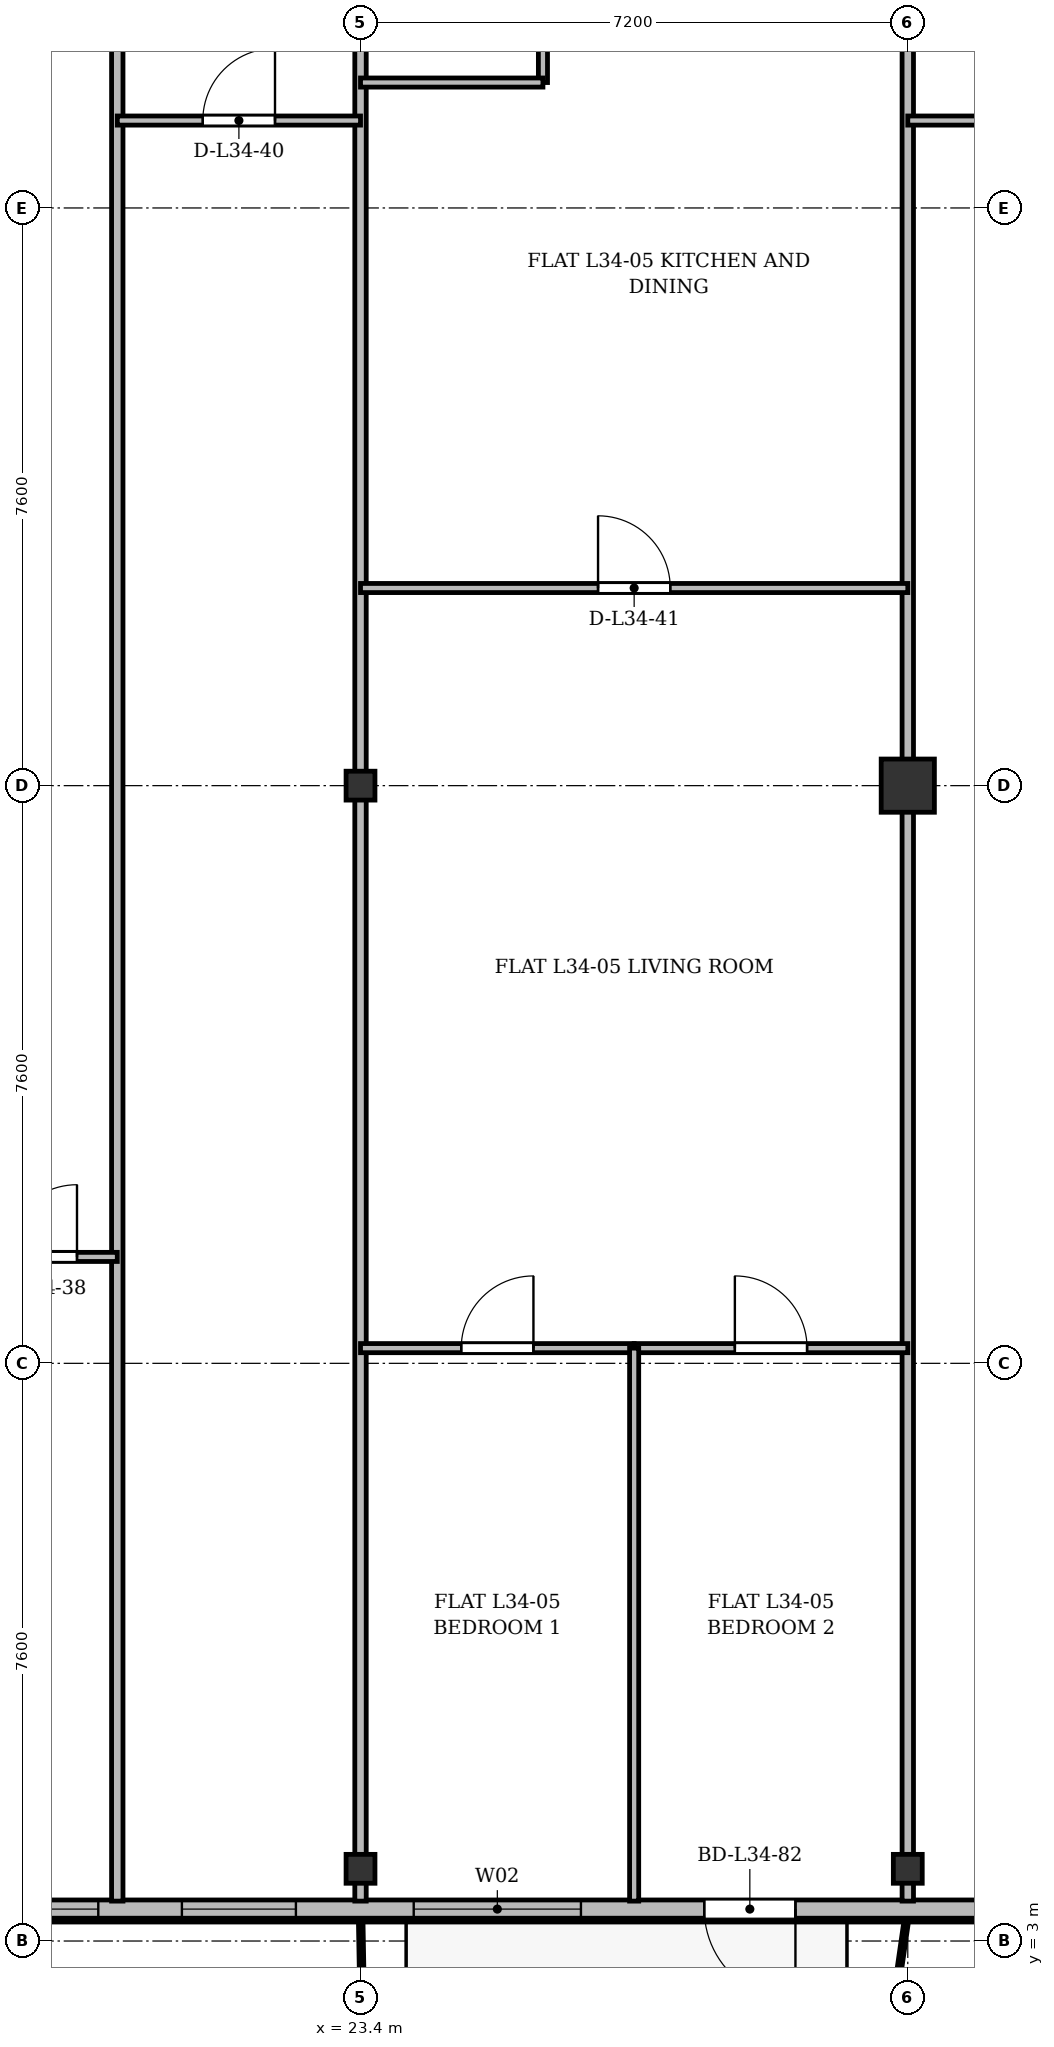
"""IFC4 building model, lengths in metres.
Left out: names, types, materials, properties, quantities, classifications, styles, units other than length and angle.
Written with IfcOpenShell. Run it as: python <this file> out.ifc"""

import sys

from ifc_helpers import new_model, si_unit, direction, frame, frame_2d, origin, origin_2d, place, context, subcontext, project, spatial, rectangle, i_section, extrude, source, transform, mapped, element, fill, save


model = new_model("IFC4")
c1 = context("Model", 3, precision=1e-05, world=origin(), true_north=direction((0.0, 1.0)))
c2 = subcontext(c1, "Body", "Model", "MODEL_VIEW")
j1 = project(units=[si_unit("LENGTHUNIT", "METRE"), si_unit("PLANEANGLEUNIT", "RADIAN")], contexts=[c1])
p1 = place(None, origin())
s1 = spatial("IfcSite", under=j1, at=p1, CompositionType="ELEMENT")
p2 = place(p1, origin())
s2 = spatial("IfcBuilding", under=s1, at=p2, CompositionType="ELEMENT")
p3 = place(p2, frame((0.0, 0.0, 132.1)))
s3 = spatial("IfcBuildingStorey", under=s2, at=p3, CompositionType="ELEMENT", Elevation=132.1)
m1 = source(origin(), c2, "Body", "SweptSolid", [
    extrude(i_section(OverallWidth=0.38, OverallDepth=0.38, WebThickness=0.02, FlangeThickness=0.03, at=origin_2d()), origin(), (0.0, 0.0, 1.0), 3.6),
])
for number, where, z_axis, x_axis in (
    (1, (23.4, 3.95, 0.0), (0.0, 0.0, 1.0), (1.0, 0.0, 0.0)),
    (2, (23.4, 18.2, 0.0), (0.0, 0.0, 1.0), (1.0, 0.0, 0.0)),
    (3, (30.6, 3.95, 0.0), (0.0, 0.0, 1.0), (1.0, 0.0, 0.0)),
):
    element("IfcColumn", number, at=place(p3, frame(where, z_axis=z_axis, x_axis=x_axis)), inside=s3, PredefinedType="COLUMN", context=c2, shape_type="MappedRepresentation", body=[
        mapped(m1, transform((0.0, 0.0, 0.0), x_axis=(1.0, 0.0, 0.0), y_axis=(0.0, 1.0, 0.0), z_axis=(0.0, 0.0, 1.0), scale=1.0)),
    ])
m2 = source(origin(), c2, "Body", "SweptSolid", [
    extrude(rectangle(XDim=0.7, YDim=0.7, at=origin_2d()), origin(), (0.0, 0.0, 1.0), 3.6),
])
p4 = place(p3, frame((30.6, 18.2, 0.0), z_axis=(0.0, 0.0, 1.0), x_axis=(1.0, 0.0, 0.0)))
e4 = element("IfcColumn", 4, at=p4, inside=s3, PredefinedType="COLUMN", context=c2, shape_type="MappedRepresentation", body=[
    mapped(m2, transform((0.0, 0.0, 0.0), x_axis=(1.0, 0.0, 0.0), y_axis=(0.0, 1.0, 0.0), z_axis=(0.0, 0.0, 1.0), scale=1.0)),
])
p5 = place(p3, frame((63.6, 3.42, 0.0), z_axis=(0.0, 0.0, 1.0), x_axis=(-1.0, 0.0, 0.0)))
e5 = element("IfcWall", 5, at=p5, inside=s3, PredefinedType="SOLIDWALL", context=c2, shape_type="SweptSolid", body=[
    extrude(rectangle(XDim=52.8, YDim=0.24, at=frame_2d((26.4, 0.0))), origin(), (0.0, 0.0, 1.0), 3.35),
])
p6 = place(p5, frame((0.42, 0.0, 0.9)))
e6 = element("IfcOpeningElement", 6, at=p6, cuts=e5, PredefinedType="OPENING", context=c2, shape_type="SweptSolid", body=[
    extrude(rectangle(XDim=1.65, YDim=1.85, at=frame_2d((0.825, 0.925))), frame((0.0, 0.13, 0.0), z_axis=(0.0, -1.0, 0.0), x_axis=(1.0, 0.0, 0.0)), (0.0, 0.0, 1.0), 0.26),
])
p7 = place(p5, frame((2.75, 0.0, 0.9)))
e7 = element("IfcOpeningElement", 7, at=p7, cuts=e5, PredefinedType="OPENING", context=c2, shape_type="SweptSolid", body=[
    extrude(rectangle(XDim=1.8, YDim=1.8, at=frame_2d((0.9, 0.9))), frame((0.0, 0.13, 0.0), z_axis=(0.0, -1.0, 0.0), x_axis=(1.0, 0.0, 0.0)), (0.0, 0.0, 1.0), 0.26),
])
p8 = place(p5, frame((5.902, 0.0, 0.0)))
e8 = element("IfcOpeningElement", 8, at=p8, cuts=e5, PredefinedType="OPENING", context=c2, shape_type="SweptSolid", body=[
    extrude(rectangle(XDim=1.2, YDim=2.2, at=frame_2d((0.6, 1.1))), frame((0.0, 0.13, 0.0), z_axis=(0.0, -1.0, 0.0), x_axis=(1.0, 0.0, 0.0)), (0.0, 0.0, 1.0), 0.26),
])
p9 = place(p5, frame((7.65, 0.0, 0.9)))
e9 = element("IfcOpeningElement", 9, at=p9, cuts=e5, PredefinedType="OPENING", context=c2, shape_type="SweptSolid", body=[
    extrude(rectangle(XDim=1.5, YDim=1.75, at=frame_2d((0.75, 0.875))), frame((0.0, 0.13, 0.0), z_axis=(0.0, -1.0, 0.0), x_axis=(1.0, 0.0, 0.0)), (0.0, 0.0, 1.0), 0.26),
])
p10 = place(p5, frame((10.0, 0.0, 0.9)))
e10 = element("IfcOpeningElement", 10, at=p10, cuts=e5, PredefinedType="OPENING", context=c2, shape_type="SweptSolid", body=[
    extrude(rectangle(XDim=2.0, YDim=1.95, at=frame_2d((1.0, 0.975))), frame((0.0, 0.13, 0.0), z_axis=(0.0, -1.0, 0.0), x_axis=(1.0, 0.0, 0.0)), (0.0, 0.0, 1.0), 0.26),
])
p11 = place(p5, frame((12.975, 0.0, 0.9)))
e11 = element("IfcOpeningElement", 11, at=p11, cuts=e5, PredefinedType="OPENING", context=c2, shape_type="SweptSolid", body=[
    extrude(rectangle(XDim=1.65, YDim=1.85, at=frame_2d((0.825, 0.925))), frame((0.0, 0.13, 0.0), z_axis=(0.0, -1.0, 0.0), x_axis=(1.0, 0.0, 0.0)), (0.0, 0.0, 1.0), 0.26),
])
p12 = place(p5, frame((15.3, 0.0, 0.9)))
e12 = element("IfcOpeningElement", 12, at=p12, cuts=e5, PredefinedType="OPENING", context=c2, shape_type="SweptSolid", body=[
    extrude(rectangle(XDim=1.8, YDim=1.8, at=frame_2d((0.9, 0.9))), frame((0.0, 0.13, 0.0), z_axis=(0.0, -1.0, 0.0), x_axis=(1.0, 0.0, 0.0)), (0.0, 0.0, 1.0), 0.26),
])
p13 = place(p5, frame((17.85, 0.0, 0.9)))
e13 = element("IfcOpeningElement", 13, at=p13, cuts=e5, PredefinedType="OPENING", context=c2, shape_type="SweptSolid", body=[
    extrude(rectangle(XDim=1.5, YDim=1.75, at=frame_2d((0.75, 0.875))), frame((0.0, 0.13, 0.0), z_axis=(0.0, -1.0, 0.0), x_axis=(1.0, 0.0, 0.0)), (0.0, 0.0, 1.0), 0.26),
])
p14 = place(p5, frame((20.7, 0.0, 0.9)))
e14 = element("IfcOpeningElement", 14, at=p14, cuts=e5, PredefinedType="OPENING", context=c2, shape_type="SweptSolid", body=[
    extrude(rectangle(XDim=1.5, YDim=1.75, at=frame_2d((0.75, 0.875))), frame((0.0, 0.13, 0.0), z_axis=(0.0, -1.0, 0.0), x_axis=(1.0, 0.0, 0.0)), (0.0, 0.0, 1.0), 0.26),
])
p15 = place(p5, frame((23.75, 0.0, 0.9)))
e15 = element("IfcOpeningElement", 15, at=p15, cuts=e5, PredefinedType="OPENING", context=c2, shape_type="SweptSolid", body=[
    extrude(rectangle(XDim=2.0, YDim=1.95, at=frame_2d((1.0, 0.975))), frame((0.0, 0.13, 0.0), z_axis=(0.0, -1.0, 0.0), x_axis=(1.0, 0.0, 0.0)), (0.0, 0.0, 1.0), 0.26),
])
p16 = place(p5, frame((28.875, 0.0, 0.9)))
e16 = element("IfcOpeningElement", 16, at=p16, cuts=e5, PredefinedType="OPENING", context=c2, shape_type="SweptSolid", body=[
    extrude(rectangle(XDim=1.65, YDim=1.85, at=frame_2d((0.825, 0.925))), frame((0.0, 0.13, 0.0), z_axis=(0.0, -1.0, 0.0), x_axis=(1.0, 0.0, 0.0)), (0.0, 0.0, 1.0), 0.26),
])
p17 = place(p5, frame((34.478, 0.0, 0.0)))
e17 = element("IfcOpeningElement", 17, at=p17, cuts=e5, PredefinedType="OPENING", context=c2, shape_type="SweptSolid", body=[
    extrude(rectangle(XDim=1.2, YDim=2.2, at=frame_2d((0.6, 1.1))), frame((0.0, 0.13, 0.0), z_axis=(0.0, -1.0, 0.0), x_axis=(1.0, 0.0, 0.0)), (0.0, 0.0, 1.0), 0.26),
])
p18 = place(p5, frame((37.3, 0.0, 0.9)))
e18 = element("IfcOpeningElement", 18, at=p18, cuts=e5, PredefinedType="OPENING", context=c2, shape_type="SweptSolid", body=[
    extrude(rectangle(XDim=2.2, YDim=1.8, at=frame_2d((1.1, 0.9))), frame((0.0, 0.13, 0.0), z_axis=(0.0, -1.0, 0.0), x_axis=(1.0, 0.0, 0.0)), (0.0, 0.0, 1.0), 0.26),
])
p19 = place(p5, frame((41.05, 0.0, 0.9)))
e19 = element("IfcOpeningElement", 19, at=p19, cuts=e5, PredefinedType="OPENING", context=c2, shape_type="SweptSolid", body=[
    extrude(rectangle(XDim=1.5, YDim=1.75, at=frame_2d((0.75, 0.875))), frame((0.0, 0.13, 0.0), z_axis=(0.0, -1.0, 0.0), x_axis=(1.0, 0.0, 0.0)), (0.0, 0.0, 1.0), 0.26),
])
p20 = place(p5, frame((43.65, 0.0, 0.9)))
e20 = element("IfcOpeningElement", 20, at=p20, cuts=e5, PredefinedType="OPENING", context=c2, shape_type="SweptSolid", body=[
    extrude(rectangle(XDim=1.5, YDim=1.75, at=frame_2d((0.75, 0.875))), frame((0.0, 0.13, 0.0), z_axis=(0.0, -1.0, 0.0), x_axis=(1.0, 0.0, 0.0)), (0.0, 0.0, 1.0), 0.26),
])
p21 = place(p5, frame((45.775, 0.0, 0.9)))
e21 = element("IfcOpeningElement", 21, at=p21, cuts=e5, PredefinedType="OPENING", context=c2, shape_type="SweptSolid", body=[
    extrude(rectangle(XDim=1.65, YDim=1.85, at=frame_2d((0.825, 0.925))), frame((0.0, 0.13, 0.0), z_axis=(0.0, -1.0, 0.0), x_axis=(1.0, 0.0, 0.0)), (0.0, 0.0, 1.0), 0.26),
])
p22 = place(p5, frame((48.1, 0.0, 0.9)))
e22 = element("IfcOpeningElement", 22, at=p22, cuts=e5, PredefinedType="OPENING", context=c2, shape_type="SweptSolid", body=[
    extrude(rectangle(XDim=1.8, YDim=1.8, at=frame_2d((0.9, 0.9))), frame((0.0, 0.13, 0.0), z_axis=(0.0, -1.0, 0.0), x_axis=(1.0, 0.0, 0.0)), (0.0, 0.0, 1.0), 0.26),
])
p23 = place(p5, frame((50.705, 0.0, 0.9)))
e23 = element("IfcOpeningElement", 23, at=p23, cuts=e5, PredefinedType="OPENING", context=c2, shape_type="SweptSolid", body=[
    extrude(rectangle(XDim=1.5, YDim=1.75, at=frame_2d((0.75, 0.875))), frame((0.0, 0.13, 0.0), z_axis=(0.0, -1.0, 0.0), x_axis=(1.0, 0.0, 0.0)), (0.0, 0.0, 1.0), 0.26),
])
for number, where, z_axis, x_axis in (
    (24, (23.4, 3.525, 0.0), (0.0, 0.0, 1.0), (0.0, 1.0, 0.0)),
    (25, (30.6, 3.525, 0.0), (0.0, 0.0, 1.0), (0.0, 1.0, 0.0)),
):
    element("IfcWall", number, at=place(p3, frame(where, z_axis=z_axis, x_axis=x_axis)), inside=s3, PredefinedType="PARTITIONING", context=c2, shape_type="SweptSolid", body=[
        extrude(rectangle(XDim=27.275, YDim=0.15, at=frame_2d((13.638, 0.0))), origin(), (0.0, 0.0, 1.0), 2.85),
    ])
p24 = place(p3, frame((20.2, 3.525, 0.0), z_axis=(0.0, 0.0, 1.0), x_axis=(0.0, 1.0, 0.0)))
e26 = element("IfcWall", 26, at=p24, inside=s3, PredefinedType="PARTITIONING", context=c2, shape_type="SweptSolid", body=[
    extrude(rectangle(XDim=27.275, YDim=0.15, at=frame_2d((13.638, 0.0))), origin(), (0.0, 0.0, 1.0), 2.75),
])
p25 = place(p3, frame((18.2, 12.0, 0.0), z_axis=(0.0, 0.0, 1.0), x_axis=(1.0, 0.0, 0.0)))
e27 = element("IfcWall", 27, at=p25, inside=s3, PredefinedType="PARTITIONING", context=c2, shape_type="SweptSolid", body=[
    extrude(rectangle(XDim=2.0, YDim=0.12, at=frame_2d((1.0, 0.0))), origin(), (0.0, 0.0, 1.0), 3.35),
])
p26 = place(p25, frame((0.52, 0.0, 0.0)))
e28 = element("IfcOpeningElement", 28, at=p26, cuts=e27, PredefinedType="OPENING", context=c2, shape_type="SweptSolid", body=[
    extrude(rectangle(XDim=0.95, YDim=2.15, at=frame_2d((0.475, 1.075))), frame((0.0, 0.07, 0.0), z_axis=(0.0, -1.0, 0.0), x_axis=(1.0, 0.0, 0.0)), (0.0, 0.0, 1.0), 0.14),
])
p27 = place(p3, frame((20.2, 26.95, 0.0), z_axis=(0.0, 0.0, 1.0), x_axis=(1.0, 0.0, 0.0)))
e29 = element("IfcWall", 29, at=p27, inside=s3, PredefinedType="PARTITIONING", context=c2, shape_type="SweptSolid", body=[
    extrude(rectangle(XDim=3.2, YDim=0.12, at=frame_2d((1.6, 0.0))), origin(), (0.0, 0.0, 1.0), 2.85),
])
p28 = place(p27, frame((1.125, 0.0, 0.0)))
e30 = element("IfcOpeningElement", 30, at=p28, cuts=e29, PredefinedType="OPENING", context=c2, shape_type="SweptSolid", body=[
    extrude(rectangle(XDim=0.95, YDim=2.15, at=frame_2d((0.475, 1.075))), frame((0.0, 0.07, 0.0), z_axis=(0.0, -1.0, 0.0), x_axis=(1.0, 0.0, 0.0)), (0.0, 0.0, 1.0), 0.14),
])
p29 = place(p3, frame((23.4, 20.8, 0.0), z_axis=(0.0, 0.0, 1.0), x_axis=(1.0, 0.0, 0.0)))
e31 = element("IfcWall", 31, at=p29, inside=s3, PredefinedType="PARTITIONING", context=c2, shape_type="SweptSolid", body=[
    extrude(rectangle(XDim=7.2, YDim=0.12, at=frame_2d((3.6, 0.0))), origin(), (0.0, 0.0, 1.0), 2.85),
])
p30 = place(p29, frame((3.125, 0.0, 0.0)))
e32 = element("IfcOpeningElement", 32, at=p30, cuts=e31, PredefinedType="OPENING", context=c2, shape_type="SweptSolid", body=[
    extrude(rectangle(XDim=0.95, YDim=2.15, at=frame_2d((0.475, 1.075))), frame((0.0, 0.07, 0.0), z_axis=(0.0, -1.0, 0.0), x_axis=(1.0, 0.0, 0.0)), (0.0, 0.0, 1.0), 0.14),
])
p31 = place(p3, frame((25.8, 27.45, 0.0), z_axis=(0.0, 0.0, 1.0), x_axis=(0.0, 1.0, 0.0)))
e33 = element("IfcWall", 33, at=p31, inside=s3, PredefinedType="PARTITIONING", context=c2, shape_type="SweptSolid", body=[
    extrude(rectangle(XDim=3.35, YDim=0.12, at=frame_2d((1.675, 0.0))), origin(), (0.0, 0.0, 1.0), 3.35),
])
p32 = place(p31, frame((0.8, 0.0, 0.0)))
e34 = element("IfcOpeningElement", 34, at=p32, cuts=e33, PredefinedType="OPENING", context=c2, shape_type="SweptSolid", body=[
    extrude(rectangle(XDim=0.85, YDim=2.1, at=frame_2d((0.425, 1.05))), frame((0.0, 0.07, 0.0), z_axis=(0.0, -1.0, 0.0), x_axis=(1.0, 0.0, 0.0)), (0.0, 0.0, 1.0), 0.14),
])
p33 = place(p3, frame((23.4, 27.45, 0.0), z_axis=(0.0, 0.0, 1.0), x_axis=(1.0, 0.0, 0.0)))
e35 = element("IfcWall", 35, at=p33, inside=s3, PredefinedType="PARTITIONING", context=c2, shape_type="SweptSolid", body=[
    extrude(rectangle(XDim=2.4, YDim=0.12, at=frame_2d((1.2, 0.0))), origin(), (0.0, 0.0, 1.0), 2.85),
])
p34 = place(p3, frame((23.4, 10.8, 0.0), z_axis=(0.0, 0.0, 1.0), x_axis=(1.0, 0.0, 0.0)))
e36 = element("IfcWall", 36, at=p34, inside=s3, PredefinedType="PARTITIONING", context=c2, shape_type="SweptSolid", body=[
    extrude(rectangle(XDim=3.6, YDim=0.12, at=frame_2d((1.8, 0.0))), origin(), (0.0, 0.0, 1.0), 2.85),
])
p35 = place(p34, frame((1.325, 0.0, 0.0)))
e37 = element("IfcOpeningElement", 37, at=p35, cuts=e36, PredefinedType="OPENING", context=c2, shape_type="SweptSolid", body=[
    extrude(rectangle(XDim=0.95, YDim=2.15, at=frame_2d((0.475, 1.075))), frame((0.0, 0.07, 0.0), z_axis=(0.0, -1.0, 0.0), x_axis=(1.0, 0.0, 0.0)), (0.0, 0.0, 1.0), 0.14),
])
p36 = place(p3, frame((27.0, 10.8, 0.0), z_axis=(0.0, 0.0, 1.0), x_axis=(1.0, 0.0, 0.0)))
e38 = element("IfcWall", 38, at=p36, inside=s3, PredefinedType="PARTITIONING", context=c2, shape_type="SweptSolid", body=[
    extrude(rectangle(XDim=3.6, YDim=0.12, at=frame_2d((1.8, 0.0))), origin(), (0.0, 0.0, 1.0), 2.85),
])
p37 = place(p36, frame((1.325, 0.0, 0.0)))
e39 = element("IfcOpeningElement", 39, at=p37, cuts=e38, PredefinedType="OPENING", context=c2, shape_type="SweptSolid", body=[
    extrude(rectangle(XDim=0.95, YDim=2.15, at=frame_2d((0.475, 1.075))), frame((0.0, 0.07, 0.0), z_axis=(0.0, -1.0, 0.0), x_axis=(1.0, 0.0, 0.0)), (0.0, 0.0, 1.0), 0.14),
])
p38 = place(p3, frame((27.0, 3.525, 0.0), z_axis=(0.0, 0.0, 1.0), x_axis=(0.0, 1.0, 0.0)))
e40 = element("IfcWall", 40, at=p38, inside=s3, PredefinedType="PARTITIONING", context=c2, shape_type="SweptSolid", body=[
    extrude(rectangle(XDim=7.275, YDim=0.12, at=frame_2d((3.638, 0.0))), origin(), (0.0, 0.0, 1.0), 2.75),
])
p39 = place(p3, frame((30.6, 26.95, 0.0), z_axis=(0.0, 0.0, 1.0), x_axis=(1.0, 0.0, 0.0)))
e41 = element("IfcWall", 41, at=p39, inside=s3, PredefinedType="PARTITIONING", context=c2, shape_type="SweptSolid", body=[
    extrude(rectangle(XDim=6.6, YDim=0.12, at=frame_2d((3.3, 0.0))), origin(), (0.0, 0.0, 1.0), 2.85),
])
p40 = place(p39, frame((2.734, 0.0, 0.0)))
e42 = element("IfcOpeningElement", 42, at=p40, cuts=e41, PredefinedType="OPENING", context=c2, shape_type="SweptSolid", body=[
    extrude(rectangle(XDim=0.95, YDim=2.15, at=frame_2d((0.475, 1.075))), frame((0.0, 0.07, 0.0), z_axis=(0.0, -1.0, 0.0), x_axis=(1.0, 0.0, 0.0)), (0.0, 0.0, 1.0), 0.14),
])
m3 = source(origin(), c2, "Body", "SweptSolid", [
    extrude(rectangle(XDim=1.2, YDim=2.2, at=frame_2d((0.6, 1.1))), frame((0.0, 0.025, 0.0), z_axis=(0.0, -1.0, 0.0), x_axis=(1.0, 0.0, 0.0)), (0.0, 0.0, 1.0), 0.05),
])
p41 = place(p17, origin())
e43 = element("IfcDoor", 43, at=p41, inside=s3, OperationType="SINGLE_SWING_LEFT", PredefinedType="DOOR", context=c2, shape_type="MappedRepresentation", body=[
    mapped(m3, transform((0.0, 0.0, 0.0), x_axis=(1.0, 0.0, 0.0), y_axis=(0.0, 1.0, 0.0), z_axis=(0.0, 0.0, 1.0), scale=1.0)),
])
fill(e17, e43)
m4 = source(origin(), c2, "Body", "SweptSolid", [
    extrude(rectangle(XDim=2.2, YDim=1.8, at=frame_2d((1.1, 0.9))), frame((0.0, 0.03, 0.0), z_axis=(0.0, -1.0, 0.0), x_axis=(1.0, 0.0, 0.0)), (0.0, 0.0, 1.0), 0.06),
])
p42 = place(p18, origin())
e44 = element("IfcWindow", 44, at=p42, inside=s3, PartitioningType="SINGLE_PANEL", PredefinedType="WINDOW", context=c2, shape_type="MappedRepresentation", body=[
    mapped(m4, transform((0.0, 0.0, 0.0), x_axis=(1.0, 0.0, 0.0), y_axis=(0.0, 1.0, 0.0), z_axis=(0.0, 0.0, 1.0), scale=1.0)),
])
fill(e18, e44)
m5 = source(origin(), c2, "Body", "SweptSolid", [
    extrude(rectangle(XDim=1.5, YDim=1.75, at=frame_2d((0.75, 0.875))), frame((0.0, 0.03, 0.0), z_axis=(0.0, -1.0, 0.0), x_axis=(1.0, 0.0, 0.0)), (0.0, 0.0, 1.0), 0.06),
])
p43 = place(p19, origin())
e45 = element("IfcWindow", 45, at=p43, inside=s3, PartitioningType="SINGLE_PANEL", PredefinedType="WINDOW", context=c2, shape_type="MappedRepresentation", body=[
    mapped(m5, transform((0.0, 0.0, 0.0), x_axis=(1.0, 0.0, 0.0), y_axis=(0.0, 1.0, 0.0), z_axis=(0.0, 0.0, 1.0), scale=1.0)),
])
fill(e19, e45)
p44 = place(p20, origin())
e46 = element("IfcWindow", 46, at=p44, inside=s3, PartitioningType="SINGLE_PANEL", PredefinedType="WINDOW", context=c2, shape_type="MappedRepresentation", body=[
    mapped(m5, transform((0.0, 0.0, 0.0), x_axis=(1.0, 0.0, 0.0), y_axis=(0.0, 1.0, 0.0), z_axis=(0.0, 0.0, 1.0), scale=1.0)),
])
fill(e20, e46)
m6 = source(origin(), c2, "Body", "SweptSolid", [
    extrude(rectangle(XDim=0.95, YDim=2.15, at=frame_2d((0.475, 1.075))), frame((0.0, 0.025, 0.0), z_axis=(0.0, -1.0, 0.0), x_axis=(1.0, 0.0, 0.0)), (0.0, 0.0, 1.0), 0.05),
])
p45 = place(p26, origin())
e47 = element("IfcDoor", 47, at=p45, inside=s3, OperationType="SINGLE_SWING_RIGHT", PredefinedType="DOOR", context=c2, shape_type="MappedRepresentation", body=[
    mapped(m6, transform((0.0, 0.0, 0.0), x_axis=(1.0, 0.0, 0.0), y_axis=(0.0, 1.0, 0.0), z_axis=(0.0, 0.0, 1.0), scale=1.0)),
])
fill(e28, e47)
p46 = place(p28, origin())
e48 = element("IfcDoor", 48, at=p46, inside=s3, OperationType="SINGLE_SWING_RIGHT", PredefinedType="DOOR", context=c2, shape_type="MappedRepresentation", body=[
    mapped(m6, transform((0.0, 0.0, 0.0), x_axis=(1.0, 0.0, 0.0), y_axis=(0.0, 1.0, 0.0), z_axis=(0.0, 0.0, 1.0), scale=1.0)),
])
fill(e30, e48)
p47 = place(p30, origin())
e49 = element("IfcDoor", 49, at=p47, inside=s3, OperationType="SINGLE_SWING_LEFT", PredefinedType="DOOR", context=c2, shape_type="MappedRepresentation", body=[
    mapped(m6, transform((0.0, 0.0, 0.0), x_axis=(1.0, 0.0, 0.0), y_axis=(0.0, 1.0, 0.0), z_axis=(0.0, 0.0, 1.0), scale=1.0)),
])
fill(e32, e49)
p48 = place(p35, origin())
e50 = element("IfcDoor", 50, at=p48, inside=s3, OperationType="SINGLE_SWING_RIGHT", PredefinedType="DOOR", context=c2, shape_type="MappedRepresentation", body=[
    mapped(m6, transform((0.0, 0.0, 0.0), x_axis=(1.0, 0.0, 0.0), y_axis=(0.0, 1.0, 0.0), z_axis=(0.0, 0.0, 1.0), scale=1.0)),
])
fill(e37, e50)
p49 = place(p37, origin())
e51 = element("IfcDoor", 51, at=p49, inside=s3, OperationType="SINGLE_SWING_LEFT", PredefinedType="DOOR", context=c2, shape_type="MappedRepresentation", body=[
    mapped(m6, transform((0.0, 0.0, 0.0), x_axis=(1.0, 0.0, 0.0), y_axis=(0.0, 1.0, 0.0), z_axis=(0.0, 0.0, 1.0), scale=1.0)),
])
fill(e39, e51)
save(model, sys.argv[1])
